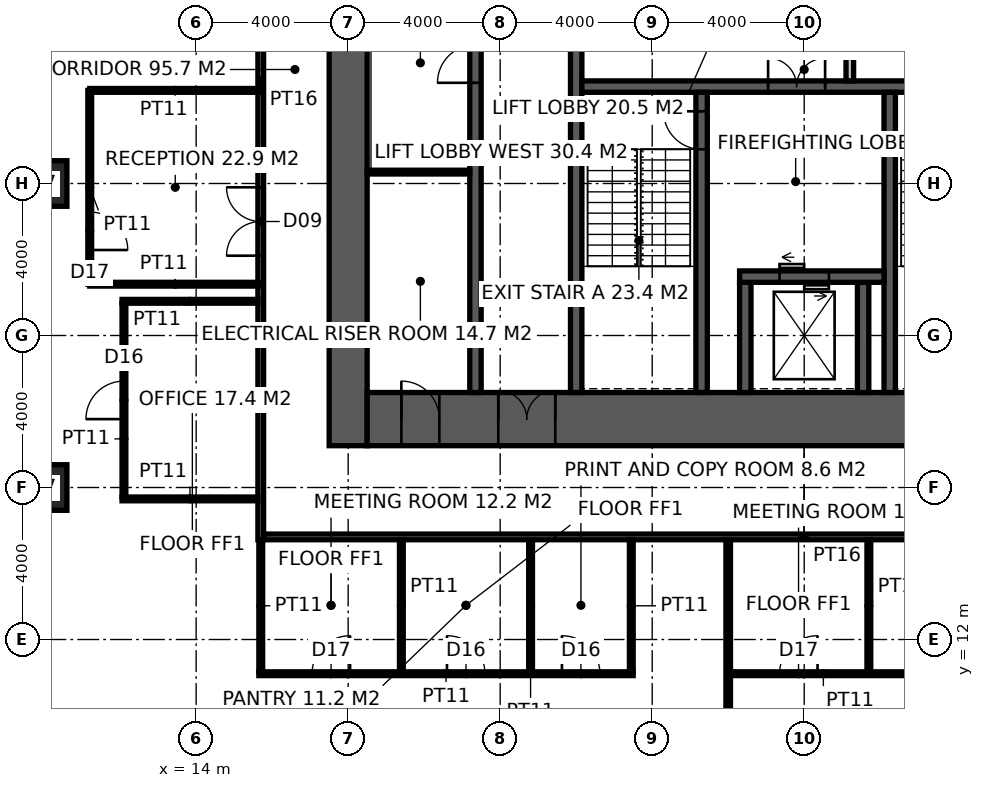
"""IFC4 building model, lengths in metres.
Left out: names, types, materials, properties, quantities, classifications, styles, units other than length and angle.
Written with IfcOpenShell. Run it as: python <this file> out.ifc"""

import sys

from ifc_helpers import new_model, si_unit, direction, frame, frame_2d, origin, origin_2d, place, context, subcontext, project, spatial, rectangle, hollow_rectangle, extrude, element, fill, save


model = new_model("IFC4")
c1 = context("Model", 3, precision=1e-05, world=origin(), true_north=direction((0.0, 1.0)))
c2 = subcontext(c1, "Body", "Model", "MODEL_VIEW")
j1 = project(units=[si_unit("LENGTHUNIT", "METRE"), si_unit("PLANEANGLEUNIT", "RADIAN")], contexts=[c1])
p1 = place(None, origin())
s1 = spatial("IfcSite", under=j1, at=p1, CompositionType="ELEMENT")
p2 = place(p1, origin())
s2 = spatial("IfcBuilding", under=s1, at=p2, CompositionType="ELEMENT")
p3 = place(p2, frame((0.0, 0.0, 59.0)))
s3 = spatial("IfcBuildingStorey", under=s2, at=p3, CompositionType="ELEMENT", Elevation=59.0)
for number, where, z_axis, x_axis in (
    (1, (10.0, 16.0, 0.0), (0.0, 0.0, 1.0), (1.0, 0.0, 0.0)),
    (2, (10.0, 24.0, 0.0), (0.0, 0.0, 1.0), (1.0, 0.0, 0.0)),
):
    element("IfcColumn", number, at=place(p3, frame(where, z_axis=z_axis, x_axis=x_axis)), inside=s3, PredefinedType="COLUMN", context=c2, shape_type="SweptSolid", body=[
        extrude(hollow_rectangle(XDim=1.2, YDim=1.2, WallThickness=0.1, at=origin_2d()), origin(), (0.0, 0.0, 1.0), 4.0),
    ])
p4 = place(p3, frame((18.0, 17.1, -0.15), z_axis=(0.0, 0.0, 1.0), x_axis=(0.0, 1.0, 0.0)))
e3 = element("IfcWall", 3, at=p4, inside=s3, PredefinedType="SHEAR", context=c2, shape_type="SweptSolid", body=[
    extrude(rectangle(XDim=19.8, YDim=1.0, at=frame_2d((9.9, 0.0))), origin(), (0.0, 0.0, 1.0), 4.0),
])
p5 = place(p3, frame((18.5, 17.8, -0.15), z_axis=(0.0, 0.0, 1.0), x_axis=(1.0, 0.0, 0.0)))
e4 = element("IfcWall", 4, at=p5, inside=s3, PredefinedType="SHEAR", context=c2, shape_type="SweptSolid", body=[
    extrude(rectangle(XDim=23.7, YDim=1.4, at=frame_2d((11.85, 0.0))), origin(), (0.0, 0.0, 1.0), 4.0),
])
p6 = place(p5, frame((3.45, 0.0, 0.15)))
e5 = element("IfcOpeningElement", 5, at=p6, cuts=e4, PredefinedType="OPENING", context=c2, shape_type="SweptSolid", body=[
    extrude(rectangle(XDim=1.5, YDim=2.4, at=frame_2d((0.75, 1.2))), frame((0.0, 0.71, 0.0), z_axis=(0.0, -1.0, 0.0), x_axis=(1.0, 0.0, 0.0)), (0.0, 0.0, 1.0), 1.42),
])
p7 = place(p5, frame((17.9, 0.0, 0.15)))
e6 = element("IfcOpeningElement", 6, at=p7, cuts=e4, PredefinedType="OPENING", context=c2, shape_type="SweptSolid", body=[
    extrude(rectangle(XDim=1.5, YDim=2.4, at=frame_2d((0.75, 1.2))), frame((0.0, 0.71, 0.0), z_axis=(0.0, -1.0, 0.0), x_axis=(1.0, 0.0, 0.0)), (0.0, 0.0, 1.0), 1.42),
])
p8 = place(p5, frame((0.9, 0.0, 0.15)))
e7 = element("IfcOpeningElement", 7, at=p8, cuts=e4, PredefinedType="OPENING", context=c2, shape_type="SweptSolid", body=[
    extrude(rectangle(XDim=1.0, YDim=2.2, at=frame_2d((0.5, 1.1))), frame((0.0, 0.71, 0.0), z_axis=(0.0, -1.0, 0.0), x_axis=(1.0, 0.0, 0.0)), (0.0, 0.0, 1.0), 1.42),
])
p9 = place(p3, frame((24.0, 18.5, -0.15), z_axis=(0.0, 0.0, 1.0), x_axis=(0.0, 1.0, 0.0)))
e8 = element("IfcWall", 8, at=p9, inside=s3, PredefinedType="SHEAR", context=c2, shape_type="SweptSolid", body=[
    extrude(rectangle(XDim=17.0, YDim=0.3, at=frame_2d((8.5, 0.0))), origin(), (0.0, 0.0, 1.0), 4.0),
])
p10 = place(p9, frame((9.6, 0.0, 0.15)))
e9 = element("IfcOpeningElement", 9, at=p10, cuts=e8, PredefinedType="OPENING", context=c2, shape_type="SweptSolid", body=[
    extrude(rectangle(XDim=1.5, YDim=2.4, at=frame_2d((0.75, 1.2))), frame((0.0, 0.16, 0.0), z_axis=(0.0, -1.0, 0.0), x_axis=(1.0, 0.0, 0.0)), (0.0, 0.0, 1.0), 0.32),
])
p11 = place(p3, frame((24.15, 26.55, -0.15), z_axis=(0.0, 0.0, 1.0), x_axis=(1.0, 0.0, 0.0)))
e10 = element("IfcWall", 10, at=p11, inside=s3, PredefinedType="SHEAR", context=c2, shape_type="SweptSolid", body=[
    extrude(rectangle(XDim=11.25, YDim=0.3, at=frame_2d((5.625, 0.0))), origin(), (0.0, 0.0, 1.0), 4.0),
])
p12 = place(p11, frame((9.25, 0.0, 0.15)))
e11 = element("IfcOpeningElement", 11, at=p12, cuts=e10, PredefinedType="OPENING", context=c2, shape_type="SweptSolid", body=[
    extrude(rectangle(XDim=1.0, YDim=2.2, at=frame_2d((0.5, 1.1))), frame((0.0, 0.16, 0.0), z_axis=(0.0, -1.0, 0.0), x_axis=(1.0, 0.0, 0.0)), (0.0, 0.0, 1.0), 0.32),
])
p13 = place(p11, frame((4.9, 0.0, 0.15)))
e12 = element("IfcOpeningElement", 12, at=p13, cuts=e10, PredefinedType="OPENING", context=c2, shape_type="SweptSolid", body=[
    extrude(rectangle(XDim=1.5, YDim=2.4, at=frame_2d((0.75, 1.2))), frame((0.0, 0.16, 0.0), z_axis=(0.0, -1.0, 0.0), x_axis=(1.0, 0.0, 0.0)), (0.0, 0.0, 1.0), 0.32),
])
p14 = place(p3, frame((27.3, 18.5, -0.15), z_axis=(0.0, 0.0, 1.0), x_axis=(0.0, 1.0, 0.0)))
e13 = element("IfcWall", 13, at=p14, inside=s3, PredefinedType="SHEAR", context=c2, shape_type="SweptSolid", body=[
    extrude(rectangle(XDim=7.9, YDim=0.3, at=frame_2d((3.95, 0.0))), origin(), (0.0, 0.0, 1.0), 4.0),
])
p15 = place(p14, frame((6.4, 0.0, 0.15)))
e14 = element("IfcOpeningElement", 14, at=p15, cuts=e13, PredefinedType="OPENING", context=c2, shape_type="SweptSolid", body=[
    extrude(rectangle(XDim=1.0, YDim=2.2, at=frame_2d((0.5, 1.1))), frame((0.0, 0.16, 0.0), z_axis=(0.0, -1.0, 0.0), x_axis=(1.0, 0.0, 0.0)), (0.0, 0.0, 1.0), 0.32),
])
p16 = place(p3, frame((32.25, 18.5, -0.15), z_axis=(0.0, 0.0, 1.0), x_axis=(0.0, 1.0, 0.0)))
e15 = element("IfcWall", 15, at=p16, inside=s3, PredefinedType="SHEAR", context=c2, shape_type="SweptSolid", body=[
    extrude(rectangle(XDim=7.9, YDim=0.3, at=frame_2d((3.95, 0.0))), origin(), (0.0, 0.0, 1.0), 4.0),
])
for number, where, z_axis, x_axis in (
    (16, (28.45, 18.5, -0.15), (0.0, 0.0, 1.0), (0.0, 1.0, 0.0)),
    (17, (31.55, 18.5, -0.15), (0.0, 0.0, 1.0), (0.0, 1.0, 0.0)),
):
    element("IfcWall", number, at=place(p3, frame(where, z_axis=z_axis, x_axis=x_axis)), inside=s3, PredefinedType="SHEAR", context=c2, shape_type="SweptSolid", body=[
        extrude(rectangle(XDim=2.9, YDim=0.3, at=frame_2d((1.45, 0.0))), origin(), (0.0, 0.0, 1.0), 4.0),
    ])
p17 = place(p3, frame((28.3, 21.55, -0.15), z_axis=(0.0, 0.0, 1.0), x_axis=(1.0, 0.0, 0.0)))
e18 = element("IfcWall", 18, at=p17, inside=s3, PredefinedType="SHEAR", context=c2, shape_type="SweptSolid", body=[
    extrude(rectangle(XDim=3.8, YDim=0.3, at=frame_2d((1.9, 0.0))), origin(), (0.0, 0.0, 1.0), 4.0),
])
p18 = place(p17, frame((1.05, 0.0, 0.15)))
e19 = element("IfcOpeningElement", 19, at=p18, cuts=e18, PredefinedType="OPENING", context=c2, shape_type="SweptSolid", body=[
    extrude(rectangle(XDim=1.3, YDim=2.4, at=frame_2d((0.65, 1.2))), frame((0.0, 0.16, 0.0), z_axis=(0.0, -1.0, 0.0), x_axis=(1.0, 0.0, 0.0)), (0.0, 0.0, 1.0), 0.32),
])
p19 = place(p3, frame((21.35, 18.5, -0.15), z_axis=(0.0, 0.0, 1.0), x_axis=(0.0, 1.0, 0.0)))
e20 = element("IfcWall", 20, at=p19, inside=s3, PredefinedType="SHEAR", context=c2, shape_type="SweptSolid", body=[
    extrude(rectangle(XDim=12.5, YDim=0.3, at=frame_2d((6.25, 0.0))), origin(), (0.0, 0.0, 1.0), 4.0),
])
p20 = place(p19, frame((8.15, 0.0, 0.15)))
e21 = element("IfcOpeningElement", 21, at=p20, cuts=e20, PredefinedType="OPENING", context=c2, shape_type="SweptSolid", body=[
    extrude(rectangle(XDim=1.0, YDim=2.2, at=frame_2d((0.5, 1.1))), frame((0.0, 0.16, 0.0), z_axis=(0.0, -1.0, 0.0), x_axis=(1.0, 0.0, 0.0)), (0.0, 0.0, 1.0), 0.32),
])
p21 = place(p3, frame((31.2, 26.7, 0.0), z_axis=(0.0, 0.0, 1.0), x_axis=(0.0, 1.0, 0.0)))
e22 = element("IfcWall", 22, at=p21, inside=s3, PredefinedType="SOLIDWALL", context=c2, shape_type="SweptSolid", body=[
    extrude(rectangle(XDim=4.3, YDim=0.2, at=frame_2d((2.15, 0.0))), origin(), (0.0, 0.0, 1.0), 3.85),
])
p22 = place(p3, frame((18.5, 24.3, 0.0), z_axis=(0.0, 0.0, 1.0), x_axis=(1.0, 0.0, 0.0)))
e23 = element("IfcWall", 23, at=p22, inside=s3, PredefinedType="PARTITIONING", context=c2, shape_type="SweptSolid", body=[
    extrude(rectangle(XDim=2.7, YDim=0.1, at=frame_2d((1.35, 0.0))), origin(), (0.0, 0.0, 1.0), 3.85),
])
p23 = place(p3, frame((15.7, 14.625, 0.0), z_axis=(0.0, 0.0, 1.0), x_axis=(0.0, 1.0, 0.0)))
e24 = element("IfcWall", 24, at=p23, inside=s3, PredefinedType="PARTITIONING", context=c2, shape_type="SweptSolid", body=[
    extrude(rectangle(XDim=24.15, YDim=0.15, at=frame_2d((12.075, 0.0))), origin(), (0.0, 0.0, 1.0), 3.85),
])
p24 = place(p23, frame((7.475, 0.0, 0.0)))
e25 = element("IfcOpeningElement", 25, at=p24, cuts=e24, PredefinedType="OPENING", context=c2, shape_type="SweptSolid", body=[
    extrude(rectangle(XDim=1.8, YDim=2.4, at=frame_2d((0.9, 1.2))), frame((0.0, 0.085, 0.0), z_axis=(0.0, -1.0, 0.0), x_axis=(1.0, 0.0, 0.0)), (0.0, 0.0, 1.0), 0.17),
])
p25 = place(p23, frame((19.425, 0.0, 0.0)))
e26 = element("IfcOpeningElement", 26, at=p25, cuts=e24, PredefinedType="OPENING", context=c2, shape_type="SweptSolid", body=[
    extrude(rectangle(XDim=1.8, YDim=2.4, at=frame_2d((0.9, 1.2))), frame((0.0, 0.085, 0.0), z_axis=(0.0, -1.0, 0.0), x_axis=(1.0, 0.0, 0.0)), (0.0, 0.0, 1.0), 0.17),
])
p26 = place(p3, frame((15.775, 14.7, 0.0), z_axis=(0.0, 0.0, 1.0), x_axis=(1.0, 0.0, 0.0)))
e27 = element("IfcWall", 27, at=p26, inside=s3, PredefinedType="PARTITIONING", context=c2, shape_type="SweptSolid", body=[
    extrude(rectangle(XDim=28.45, YDim=0.15, at=frame_2d((14.225, 0.0))), origin(), (0.0, 0.0, 1.0), 3.85),
])
p27 = place(p3, frame((28.0, 0.3, 0.0), z_axis=(0.0, 0.0, 1.0), x_axis=(0.0, 1.0, 0.0)))
e28 = element("IfcWall", 28, at=p27, inside=s3, PredefinedType="PARTITIONING", context=c2, shape_type="SweptSolid", body=[
    extrude(rectangle(XDim=14.325, YDim=0.12, at=frame_2d((7.163, 0.0))), origin(), (0.0, 0.0, 1.0), 3.85),
])
p28 = place(p3, frame((15.65, 11.1, 0.0), z_axis=(0.0, 0.0, 1.0), x_axis=(1.0, 0.0, 0.0)))
e29 = element("IfcWall", 29, at=p28, inside=s3, PredefinedType="PARTITIONING", context=c2, shape_type="SweptSolid", body=[
    extrude(rectangle(XDim=9.85, YDim=0.1, at=frame_2d((4.925, 0.0))), origin(), (0.0, 0.0, 1.0), 3.85),
])
p29 = place(p28, frame((1.4, 0.0, 0.0)))
e30 = element("IfcOpeningElement", 30, at=p29, cuts=e29, PredefinedType="OPENING", context=c2, shape_type="SweptSolid", body=[
    extrude(rectangle(XDim=1.0, YDim=2.2, at=frame_2d((0.5, 1.1))), frame((0.0, 0.06, 0.0), z_axis=(0.0, -1.0, 0.0), x_axis=(1.0, 0.0, 0.0)), (0.0, 0.0, 1.0), 0.12),
])
p30 = place(p28, frame((4.95, 0.0, 0.0)))
e31 = element("IfcOpeningElement", 31, at=p30, cuts=e29, PredefinedType="OPENING", context=c2, shape_type="SweptSolid", body=[
    extrude(rectangle(XDim=1.0, YDim=2.2, at=frame_2d((0.5, 1.1))), frame((0.0, 0.06, 0.0), z_axis=(0.0, -1.0, 0.0), x_axis=(1.0, 0.0, 0.0)), (0.0, 0.0, 1.0), 0.12),
])
p31 = place(p28, frame((7.975, 0.0, 0.0)))
e32 = element("IfcOpeningElement", 32, at=p31, cuts=e29, PredefinedType="OPENING", context=c2, shape_type="SweptSolid", body=[
    extrude(rectangle(XDim=1.0, YDim=2.2, at=frame_2d((0.5, 1.1))), frame((0.0, 0.06, 0.0), z_axis=(0.0, -1.0, 0.0), x_axis=(1.0, 0.0, 0.0)), (0.0, 0.0, 1.0), 0.12),
])
p32 = place(p3, frame((28.061, 11.1, 0.0), z_axis=(0.0, 0.0, 1.0), x_axis=(1.0, 0.0, 0.0)))
e33 = element("IfcWall", 33, at=p32, inside=s3, PredefinedType="PARTITIONING", context=c2, shape_type="SweptSolid", body=[
    extrude(rectangle(XDim=16.289, YDim=0.1, at=frame_2d((8.145, 0.0))), origin(), (0.0, 0.0, 1.0), 3.85),
])
p33 = place(p32, frame((1.29, 0.0, 0.0)))
e34 = element("IfcOpeningElement", 34, at=p33, cuts=e33, PredefinedType="OPENING", context=c2, shape_type="SweptSolid", body=[
    extrude(rectangle(XDim=1.0, YDim=2.2, at=frame_2d((0.5, 1.1))), frame((0.0, 0.06, 0.0), z_axis=(0.0, -1.0, 0.0), x_axis=(1.0, 0.0, 0.0)), (0.0, 0.0, 1.0), 0.12),
])
p34 = place(p32, frame((4.84, 0.0, 0.0)))
e35 = element("IfcOpeningElement", 35, at=p34, cuts=e33, PredefinedType="OPENING", context=c2, shape_type="SweptSolid", body=[
    extrude(rectangle(XDim=1.0, YDim=2.2, at=frame_2d((0.5, 1.1))), frame((0.0, 0.06, 0.0), z_axis=(0.0, -1.0, 0.0), x_axis=(1.0, 0.0, 0.0)), (0.0, 0.0, 1.0), 0.12),
])
p35 = place(p32, frame((7.865, 0.0, 0.0)))
e36 = element("IfcOpeningElement", 36, at=p35, cuts=e33, PredefinedType="OPENING", context=c2, shape_type="SweptSolid", body=[
    extrude(rectangle(XDim=1.0, YDim=2.2, at=frame_2d((0.5, 1.1))), frame((0.0, 0.06, 0.0), z_axis=(0.0, -1.0, 0.0), x_axis=(1.0, 0.0, 0.0)), (0.0, 0.0, 1.0), 0.12),
])
p36 = place(p32, frame((10.74, 0.0, 0.0)))
e37 = element("IfcOpeningElement", 37, at=p36, cuts=e33, PredefinedType="OPENING", context=c2, shape_type="SweptSolid", body=[
    extrude(rectangle(XDim=1.0, YDim=2.2, at=frame_2d((0.5, 1.1))), frame((0.0, 0.06, 0.0), z_axis=(0.0, -1.0, 0.0), x_axis=(1.0, 0.0, 0.0)), (0.0, 0.0, 1.0), 0.12),
])
p37 = place(p32, frame((14.014, 0.0, 0.0)))
e38 = element("IfcOpeningElement", 38, at=p37, cuts=e33, PredefinedType="OPENING", context=c2, shape_type="SweptSolid", body=[
    extrude(rectangle(XDim=1.0, YDim=2.2, at=frame_2d((0.5, 1.1))), frame((0.0, 0.06, 0.0), z_axis=(0.0, -1.0, 0.0), x_axis=(1.0, 0.0, 0.0)), (0.0, 0.0, 1.0), 0.12),
])
for number, where, z_axis, x_axis in (
    (39, (12.05, 15.7, 0.0), (0.0, 0.0, 1.0), (1.0, 0.0, 0.0)),
    (40, (12.05, 20.9, 0.0), (0.0, 0.0, 1.0), (1.0, 0.0, 0.0)),
):
    element("IfcWall", number, at=place(p3, frame(where, z_axis=z_axis, x_axis=x_axis)), inside=s3, PredefinedType="PARTITIONING", context=c2, shape_type="SweptSolid", body=[
        extrude(rectangle(XDim=3.575, YDim=0.1, at=frame_2d((1.788, 0.0))), origin(), (0.0, 0.0, 1.0), 3.85),
    ])
p38 = place(p3, frame((12.1, 15.75, 0.0), z_axis=(0.0, 0.0, 1.0), x_axis=(0.0, 1.0, 0.0)))
e41 = element("IfcWall", 41, at=p38, inside=s3, PredefinedType="PARTITIONING", context=c2, shape_type="SweptSolid", body=[
    extrude(rectangle(XDim=5.1, YDim=0.1, at=frame_2d((2.55, 0.0))), origin(), (0.0, 0.0, 1.0), 3.85),
])
p39 = place(p38, frame((2.05, 0.0, 0.0)))
e42 = element("IfcOpeningElement", 42, at=p39, cuts=e41, PredefinedType="OPENING", context=c2, shape_type="SweptSolid", body=[
    extrude(rectangle(XDim=1.0, YDim=2.2, at=frame_2d((0.5, 1.1))), frame((0.0, 0.06, 0.0), z_axis=(0.0, -1.0, 0.0), x_axis=(1.0, 0.0, 0.0)), (0.0, 0.0, 1.0), 0.12),
])
for number, where, z_axis, x_axis in (
    (43, (15.7, 11.15, 0.0), (0.0, 0.0, 1.0), (0.0, 1.0, 0.0)),
    (44, (19.4, 11.15, 0.0), (0.0, 0.0, 1.0), (0.0, 1.0, 0.0)),
    (45, (22.8, 11.15, 0.0), (0.0, 0.0, 1.0), (0.0, 1.0, 0.0)),
    (46, (25.45, 11.15, 0.0), (0.0, 0.0, 1.0), (0.0, 1.0, 0.0)),
    (47, (31.701, 11.15, 0.0), (0.0, 0.0, 1.0), (0.0, 1.0, 0.0)),
):
    element("IfcWall", number, at=place(p3, frame(where, z_axis=z_axis, x_axis=x_axis)), inside=s3, PredefinedType="PARTITIONING", context=c2, shape_type="SweptSolid", body=[
        extrude(rectangle(XDim=3.475, YDim=0.1, at=frame_2d((1.738, 0.0))), origin(), (0.0, 0.0, 1.0), 3.85),
    ])
p40 = place(p3, frame((15.7, 26.45, 0.0), z_axis=(0.0, 0.0, 1.0), x_axis=(-1.0, 0.0, 0.0)))
e48 = element("IfcWall", 48, at=p40, inside=s3, PredefinedType="PARTITIONING", context=c2, shape_type="SweptSolid", body=[
    extrude(rectangle(XDim=4.5, YDim=0.1, at=frame_2d((2.25, 0.0))), origin(), (0.0, 0.0, 1.0), 3.85),
])
p41 = place(p3, frame((11.2, 26.45, 0.0), z_axis=(0.0, 0.0, 1.0), x_axis=(0.0, -1.0, 0.0)))
e49 = element("IfcWall", 49, at=p41, inside=s3, PredefinedType="PARTITIONING", context=c2, shape_type="SweptSolid", body=[
    extrude(rectangle(XDim=5.1, YDim=0.1, at=frame_2d((2.55, 0.0))), origin(), (0.0, 0.0, 1.0), 3.85),
])
p42 = place(p41, frame((3.2, 0.0, 0.0)))
e50 = element("IfcOpeningElement", 50, at=p42, cuts=e49, PredefinedType="OPENING", context=c2, shape_type="SweptSolid", body=[
    extrude(rectangle(XDim=1.0, YDim=2.2, at=frame_2d((0.5, 1.1))), frame((0.0, 0.06, 0.0), z_axis=(0.0, -1.0, 0.0), x_axis=(1.0, 0.0, 0.0)), (0.0, 0.0, 1.0), 0.12),
])
p43 = place(p3, frame((11.2, 21.35, 0.0), z_axis=(0.0, 0.0, 1.0), x_axis=(1.0, 0.0, 0.0)))
e51 = element("IfcWall", 51, at=p43, inside=s3, PredefinedType="PARTITIONING", context=c2, shape_type="SweptSolid", body=[
    extrude(rectangle(XDim=4.5, YDim=0.1, at=frame_2d((2.25, 0.0))), origin(), (0.0, 0.0, 1.0), 3.85),
])
p44 = place(p15, origin())
e52 = element("IfcDoor", 52, at=p44, inside=s3, OperationType="SINGLE_SWING_RIGHT", PredefinedType="DOOR", context=c2, shape_type="SweptSolid", body=[
    extrude(rectangle(XDim=1.0, YDim=2.2, at=frame_2d((0.5, 1.1))), frame((0.0, 0.025, 0.0), z_axis=(0.0, -1.0, 0.0), x_axis=(1.0, 0.0, 0.0)), (0.0, 0.0, 1.0), 0.05),
])
fill(e14, e52)
p45 = place(p13, origin())
e53 = element("IfcDoor", 53, at=p45, inside=s3, OperationType="DOUBLE_DOOR_DOUBLE_SWING", PredefinedType="DOOR", context=c2, shape_type="SweptSolid", body=[
    extrude(rectangle(XDim=1.5, YDim=2.4, at=frame_2d((0.75, 1.2))), frame((0.0, 0.025, 0.0), z_axis=(0.0, -1.0, 0.0), x_axis=(1.0, 0.0, 0.0)), (0.0, 0.0, 1.0), 0.05),
])
fill(e12, e53)
p46 = place(p20, origin())
e54 = element("IfcDoor", 54, at=p46, inside=s3, OperationType="SINGLE_SWING_LEFT", PredefinedType="DOOR", context=c2, shape_type="SweptSolid", body=[
    extrude(rectangle(XDim=1.0, YDim=2.2, at=frame_2d((0.5, 1.1))), frame((0.0, 0.025, 0.0), z_axis=(0.0, -1.0, 0.0), x_axis=(1.0, 0.0, 0.0)), (0.0, 0.0, 1.0), 0.05),
])
fill(e21, e54)
p47 = place(p6, origin())
e55 = element("IfcDoor", 55, at=p47, inside=s3, OperationType="DOUBLE_DOOR_DOUBLE_SWING", PredefinedType="DOOR", context=c2, shape_type="SweptSolid", body=[
    extrude(rectangle(XDim=1.5, YDim=2.4, at=frame_2d((0.75, 1.2))), frame((0.0, 0.025, 0.0), z_axis=(0.0, -1.0, 0.0), x_axis=(1.0, 0.0, 0.0)), (0.0, 0.0, 1.0), 0.05),
])
fill(e5, e55)
p48 = place(p8, origin())
e56 = element("IfcDoor", 56, at=p48, inside=s3, OperationType="SINGLE_SWING_LEFT", PredefinedType="DOOR", context=c2, shape_type="SweptSolid", body=[
    extrude(rectangle(XDim=1.0, YDim=2.2, at=frame_2d((0.5, 1.1))), frame((0.0, 0.025, 0.0), z_axis=(0.0, -1.0, 0.0), x_axis=(1.0, 0.0, 0.0)), (0.0, 0.0, 1.0), 0.05),
])
fill(e7, e56)
p49 = place(p24, origin())
e57 = element("IfcDoor", 57, at=p49, inside=s3, OperationType="DOUBLE_DOOR_DOUBLE_SWING", PredefinedType="DOOR", context=c2, shape_type="SweptSolid", body=[
    extrude(rectangle(XDim=1.8, YDim=2.4, at=frame_2d((0.9, 1.2))), frame((0.0, 0.025, 0.0), z_axis=(0.0, -1.0, 0.0), x_axis=(1.0, 0.0, 0.0)), (0.0, 0.0, 1.0), 0.05),
])
fill(e25, e57)
p50 = place(p29, origin())
e58 = element("IfcDoor", 58, at=p50, inside=s3, OperationType="SINGLE_SWING_RIGHT", PredefinedType="DOOR", context=c2, shape_type="SweptSolid", body=[
    extrude(rectangle(XDim=1.0, YDim=2.2, at=frame_2d((0.5, 1.1))), frame((0.0, 0.025, 0.0), z_axis=(0.0, -1.0, 0.0), x_axis=(1.0, 0.0, 0.0)), (0.0, 0.0, 1.0), 0.05),
])
fill(e30, e58)
p51 = place(p30, origin())
e59 = element("IfcDoor", 59, at=p51, inside=s3, OperationType="SINGLE_SWING_LEFT", PredefinedType="DOOR", context=c2, shape_type="SweptSolid", body=[
    extrude(rectangle(XDim=1.0, YDim=2.2, at=frame_2d((0.5, 1.1))), frame((0.0, 0.025, 0.0), z_axis=(0.0, -1.0, 0.0), x_axis=(1.0, 0.0, 0.0)), (0.0, 0.0, 1.0), 0.05),
])
fill(e31, e59)
p52 = place(p31, origin())
e60 = element("IfcDoor", 60, at=p52, inside=s3, OperationType="SINGLE_SWING_LEFT", PredefinedType="DOOR", context=c2, shape_type="SweptSolid", body=[
    extrude(rectangle(XDim=1.0, YDim=2.2, at=frame_2d((0.5, 1.1))), frame((0.0, 0.025, 0.0), z_axis=(0.0, -1.0, 0.0), x_axis=(1.0, 0.0, 0.0)), (0.0, 0.0, 1.0), 0.05),
])
fill(e32, e60)
p53 = place(p39, origin())
e61 = element("IfcDoor", 61, at=p53, inside=s3, OperationType="SINGLE_SWING_LEFT", PredefinedType="DOOR", context=c2, shape_type="SweptSolid", body=[
    extrude(rectangle(XDim=1.0, YDim=2.2, at=frame_2d((0.5, 1.1))), frame((0.0, 0.025, 0.0), z_axis=(0.0, -1.0, 0.0), x_axis=(1.0, 0.0, 0.0)), (0.0, 0.0, 1.0), 0.05),
])
fill(e42, e61)
p54 = place(p33, origin())
e62 = element("IfcDoor", 62, at=p54, inside=s3, OperationType="SINGLE_SWING_RIGHT", PredefinedType="DOOR", context=c2, shape_type="SweptSolid", body=[
    extrude(rectangle(XDim=1.0, YDim=2.2, at=frame_2d((0.5, 1.1))), frame((0.0, 0.025, 0.0), z_axis=(0.0, -1.0, 0.0), x_axis=(1.0, 0.0, 0.0)), (0.0, 0.0, 1.0), 0.05),
])
fill(e34, e62)
p55 = place(p42, origin())
e63 = element("IfcDoor", 63, at=p55, inside=s3, OperationType="SINGLE_SWING_RIGHT", PredefinedType="DOOR", context=c2, shape_type="SweptSolid", body=[
    extrude(rectangle(XDim=1.0, YDim=2.2, at=frame_2d((0.5, 1.1))), frame((0.0, 0.025, 0.0), z_axis=(0.0, -1.0, 0.0), x_axis=(1.0, 0.0, 0.0)), (0.0, 0.0, 1.0), 0.05),
])
fill(e50, e63)
p56 = place(p18, origin())
e64 = element("IfcDoor", 64, at=p56, inside=s3, OperationType="DOUBLE_DOOR_SLIDING", PredefinedType="DOOR", context=c2, shape_type="SweptSolid", body=[
    extrude(rectangle(XDim=1.3, YDim=2.4, at=frame_2d((0.65, 1.2))), frame((0.0, 0.025, 0.0), z_axis=(0.0, -1.0, 0.0), x_axis=(1.0, 0.0, 0.0)), (0.0, 0.0, 1.0), 0.05),
])
fill(e19, e64)
save(model, sys.argv[1])
